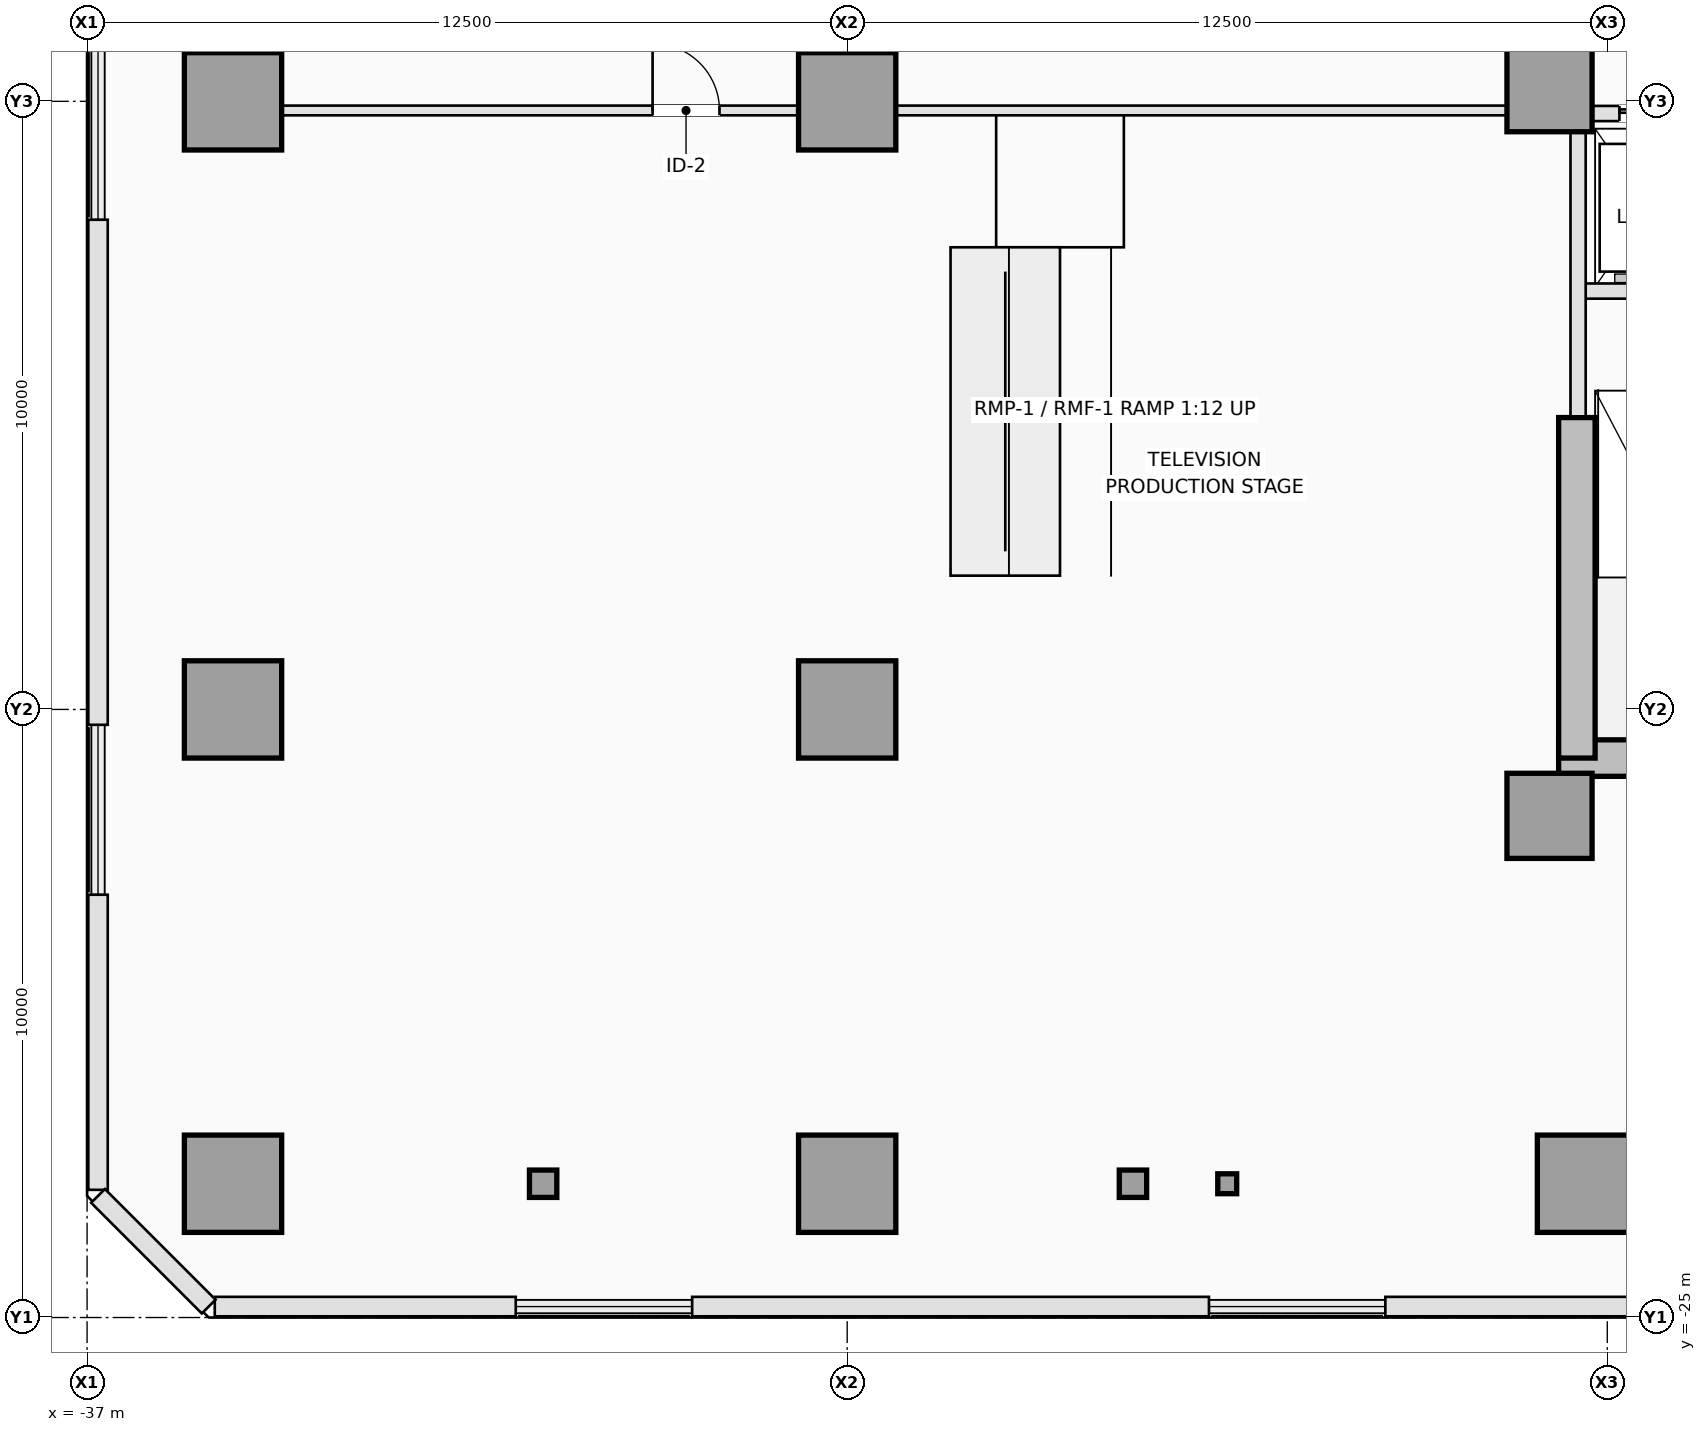
"""IFC4 building model, lengths in metres.
Left out: names, types, materials, properties, quantities, classifications, styles, units other than length and angle.
Written with IfcOpenShell. Run it as: python <this file> out.ifc"""

import sys

from ifc_helpers import new_model, si_unit, direction, frame, frame_2d, origin, origin_2d, place, context, subcontext, project, spatial, rectangle, i_section, extrude, element, fill, save


model = new_model("IFC4")
c1 = context("Model", 3, precision=1e-05, world=origin(), true_north=direction((0.0, 1.0)))
c2 = subcontext(c1, "Body", "Model", "MODEL_VIEW")
j1 = project(units=[si_unit("LENGTHUNIT", "METRE"), si_unit("PLANEANGLEUNIT", "RADIAN")], contexts=[c1])
p1 = place(None, origin())
s1 = spatial("IfcSite", under=j1, at=p1, CompositionType="ELEMENT")
p2 = place(p1, origin())
s2 = spatial("IfcBuilding", under=s1, at=p2, CompositionType="ELEMENT")
p3 = place(p2, frame((0.0, 0.0, 5.0)))
s3 = spatial("IfcBuildingStorey", under=s2, at=p3, CompositionType="ELEMENT", Elevation=5.0)
p4 = place(p3, frame((-12.8, -15.8, 0.0), z_axis=(0.0, 0.0, 1.0), x_axis=(1.0, 0.0, 0.0)))
e1 = element("IfcWall", 1, at=p4, inside=s3, PredefinedType="SHEAR", context=c2, shape_type="SweptSolid", body=[
    extrude(rectangle(XDim=4.2, YDim=0.6, at=frame_2d((2.1, 0.0))), origin(), (0.0, 0.0, 1.0), 4.5),
])
p5 = place(p3, frame((-12.5, -15.8, 0.0), z_axis=(0.0, 0.0, 1.0), x_axis=(0.0, 1.0, 0.0)))
e2 = element("IfcWall", 2, at=p5, inside=s3, PredefinedType="SHEAR", context=c2, shape_type="SweptSolid", body=[
    extrude(rectangle(XDim=5.6, YDim=0.6, at=frame_2d((2.8, 0.0))), origin(), (0.0, 0.0, 1.0), 4.5),
])
for number, where, z_axis, x_axis in (
    (3, (-12.95, -16.75, 0.0), (0.0, 0.0, 1.0), (1.0, 0.0, 0.0)),
    (4, (-12.95, -4.8, 0.0), (0.0, 0.0, 1.0), (1.0, 0.0, 0.0)),
):
    element("IfcColumn", number, at=place(p3, frame(where, z_axis=z_axis, x_axis=x_axis)), inside=s3, PredefinedType="COLUMN", context=c2, shape_type="SweptSolid", body=[
        extrude(rectangle(XDim=1.4, YDim=1.4, at=origin_2d()), origin(), (0.0, 0.0, 1.0), 4.5),
    ])
for number, where, z_axis, x_axis in (
    (5, (-34.6, -22.8, 0.0), (0.0, 0.0, 1.0), (1.0, 0.0, 0.0)),
    (6, (-24.5, -22.8, 0.0), (0.0, 0.0, 1.0), (1.0, 0.0, 0.0)),
    (7, (-12.35, -22.8, 0.0), (0.0, 0.0, 1.0), (1.0, 0.0, 0.0)),
    (8, (-34.6, -15.0, 0.0), (0.0, 0.0, 1.0), (1.0, 0.0, 0.0)),
    (9, (-24.5, -15.0, 0.0), (0.0, 0.0, 1.0), (1.0, 0.0, 0.0)),
    (10, (-34.6, -5.0, 0.0), (0.0, 0.0, 1.0), (1.0, 0.0, 0.0)),
    (11, (-24.5, -5.0, 0.0), (0.0, 0.0, 1.0), (1.0, 0.0, 0.0)),
):
    element("IfcColumn", number, at=place(p3, frame(where, z_axis=z_axis, x_axis=x_axis)), inside=s3, PredefinedType="COLUMN", context=c2, shape_type="SweptSolid", body=[
        extrude(rectangle(XDim=1.6, YDim=1.6, at=origin_2d()), origin(), (0.0, 0.0, 1.0), 4.5),
    ])
p6 = place(p3, frame((-18.25, -22.8, 0.0), z_axis=(0.0, 0.0, 1.0), x_axis=(1.0, 0.0, 0.0)))
e12 = element("IfcColumn", 12, at=p6, inside=s3, PredefinedType="COLUMN", context=c2, shape_type="SweptSolid", body=[
    extrude(i_section(OverallWidth=0.311, OverallDepth=0.327, WebThickness=0.016, FlangeThickness=0.025, FilletRadius=0.017, at=origin_2d()), origin(), (0.0, 0.0, 1.0), 4.5),
])
for number, where, z_axis, x_axis in (
    (13, (-29.5, -22.8, 0.0), (0.0, 0.0, 1.0), (1.0, 0.0, 0.0)),
    (14, (-19.8, -22.8, 0.0), (0.0, 0.0, 1.0), (1.0, 0.0, 0.0)),
):
    element("IfcColumn", number, at=place(p3, frame(where, z_axis=z_axis, x_axis=x_axis)), inside=s3, PredefinedType="PILASTER", context=c2, shape_type="SweptSolid", body=[
        extrude(rectangle(XDim=0.45, YDim=0.45, at=origin_2d()), origin(), (0.0, 0.0, 1.0), 4.5),
    ])
p7 = place(p3, frame((-10.95, -24.82, 0.0), z_axis=(0.0, 0.0, 1.0), x_axis=(-1.0, 0.0, 0.0)))
e15 = element("IfcWall", 15, at=p7, inside=s3, PredefinedType="STANDARD", context=c2, shape_type="SweptSolid", body=[
    extrude(rectangle(XDim=4.699, YDim=0.32, at=frame_2d((2.35, 0.0))), origin(), (0.0, 0.0, 1.0), 4.2),
])
p8 = place(p3, frame((-18.551, -24.82, 0.0), z_axis=(0.0, 0.0, 1.0), x_axis=(-1.0, 0.0, 0.0)))
e16 = element("IfcWall", 16, at=p8, inside=s3, PredefinedType="STANDARD", context=c2, shape_type="SweptSolid", body=[
    extrude(rectangle(XDim=8.499, YDim=0.32, at=frame_2d((4.25, 0.0))), origin(), (0.0, 0.0, 1.0), 4.2),
])
p9 = place(p3, frame((-29.95, -24.82, 0.0), z_axis=(0.0, 0.0, 1.0), x_axis=(-1.0, 0.0, 0.0)))
e17 = element("IfcWall", 17, at=p9, inside=s3, PredefinedType="STANDARD", context=c2, shape_type="SweptSolid", body=[
    extrude(rectangle(XDim=4.949, YDim=0.32, at=frame_2d((2.475, 0.0))), origin(), (0.0, 0.0, 1.0), 4.2),
])
p10 = place(p3, frame((-36.82, -22.9, 0.0), z_axis=(0.0, 0.0, 1.0), x_axis=(0.0, 1.0, 0.0)))
e18 = element("IfcWall", 18, at=p10, inside=s3, PredefinedType="STANDARD", context=c2, shape_type="SweptSolid", body=[
    extrude(rectangle(XDim=4.853, YDim=0.32, at=frame_2d((2.426, 0.0))), origin(), (0.0, 0.0, 1.0), 4.2),
])
p11 = place(p3, frame((-36.82, -15.253, 0.0), z_axis=(0.0, 0.0, 1.0), x_axis=(0.0, 1.0, 0.0)))
e19 = element("IfcWall", 19, at=p11, inside=s3, PredefinedType="STANDARD", context=c2, shape_type="SweptSolid", body=[
    extrude(rectangle(XDim=8.305, YDim=0.32, at=frame_2d((4.153, 0.0))), origin(), (0.0, 0.0, 1.0), 4.2),
])
p12 = place(p3, frame((-35.0, -24.82, 0.0), z_axis=(0.0, 0.0, 1.0), x_axis=(-0.707106781187, 0.707106781187, 0.0)))
e20 = element("IfcWall", 20, at=p12, inside=s3, PredefinedType="STANDARD", context=c2, shape_type="SweptSolid", body=[
    extrude(rectangle(XDim=2.574, YDim=0.32, at=frame_2d((1.287, 0.0))), origin(), (0.0, 0.0, 1.0), 4.2),
])
p13 = place(p3, frame((-12.38, -8.12, 0.0), z_axis=(0.0, 0.0, 1.0), x_axis=(1.0, 0.0, 0.0)))
e21 = element("IfcWall", 21, at=p13, inside=s3, PredefinedType="PARTITIONING", context=c2, shape_type="SweptSolid", body=[
    extrude(rectangle(XDim=3.22, YDim=0.25, at=frame_2d((1.61, 0.0))), origin(), (0.0, 0.0, 1.0), 4.2),
])
p14 = place(p3, frame((-12.48, -10.18, 0.0), z_axis=(0.0, 0.0, 1.0), x_axis=(0.0, 1.0, 0.0)))
e22 = element("IfcWall", 22, at=p14, inside=s3, PredefinedType="PARTITIONING", context=c2, shape_type="SweptSolid", body=[
    extrude(rectangle(XDim=4.678, YDim=0.25, at=frame_2d((2.339, 0.0))), origin(), (0.0, 0.0, 1.0), 4.2),
])
p15 = place(p3, frame((-12.248, -5.2, 0.0), z_axis=(0.0, 0.0, 1.0), x_axis=(1.0, 0.0, 0.0)))
e23 = element("IfcWall", 23, at=p15, inside=s3, PredefinedType="PARTITIONING", context=c2, shape_type="SweptSolid", body=[
    extrude(rectangle(XDim=7.796, YDim=0.25, at=frame_2d((3.898, 0.0))), origin(), (0.0, 0.0, 1.0), 4.2),
])
p16 = place(p15, frame((0.448, 0.0, 0.0)))
e24 = element("IfcOpeningElement", 24, at=p16, cuts=e23, PredefinedType="OPENING", context=c2, shape_type="SweptSolid", body=[
    extrude(rectangle(XDim=1.0, YDim=2.15, at=frame_2d((0.5, 1.075))), frame((0.0, 0.135, 0.0), z_axis=(0.0, -1.0, 0.0), x_axis=(1.0, 0.0, 0.0)), (0.0, 0.0, 1.0), 0.27),
])
p17 = place(p15, frame((2.398, 0.0, 0.0)))
e25 = element("IfcOpeningElement", 25, at=p17, cuts=e23, PredefinedType="OPENING", context=c2, shape_type="SweptSolid", body=[
    extrude(rectangle(XDim=1.0, YDim=2.15, at=frame_2d((0.5, 1.075))), frame((0.0, 0.135, 0.0), z_axis=(0.0, -1.0, 0.0), x_axis=(1.0, 0.0, 0.0)), (0.0, 0.0, 1.0), 0.27),
])
p18 = place(p15, frame((4.348, 0.0, 0.0)))
e26 = element("IfcOpeningElement", 26, at=p18, cuts=e23, PredefinedType="OPENING", context=c2, shape_type="SweptSolid", body=[
    extrude(rectangle(XDim=1.0, YDim=2.15, at=frame_2d((0.5, 1.075))), frame((0.0, 0.135, 0.0), z_axis=(0.0, -1.0, 0.0), x_axis=(1.0, 0.0, 0.0)), (0.0, 0.0, 1.0), 0.27),
])
p19 = place(p15, frame((6.298, 0.0, 0.0)))
e27 = element("IfcOpeningElement", 27, at=p19, cuts=e23, PredefinedType="OPENING", context=c2, shape_type="SweptSolid", body=[
    extrude(rectangle(XDim=1.0, YDim=2.15, at=frame_2d((0.5, 1.075))), frame((0.0, 0.135, 0.0), z_axis=(0.0, -1.0, 0.0), x_axis=(1.0, 0.0, 0.0)), (0.0, 0.0, 1.0), 0.27),
])
p20 = place(p3, frame((-33.798, -5.15, 0.0), z_axis=(0.0, 0.0, 1.0), x_axis=(1.0, 0.0, 0.0)))
e28 = element("IfcWall", 28, at=p20, inside=s3, PredefinedType="PARTITIONING", context=c2, shape_type="SweptSolid", body=[
    extrude(rectangle(XDim=8.496, YDim=0.16, at=frame_2d((4.248, 0.0))), origin(), (0.0, 0.0, 1.0), 3.176),
])
p21 = place(p20, frame((6.098, 0.0, 0.0)))
e29 = element("IfcOpeningElement", 29, at=p21, cuts=e28, PredefinedType="OPENING", context=c2, shape_type="SweptSolid", body=[
    extrude(rectangle(XDim=1.1, YDim=2.15, at=frame_2d((0.55, 1.075))), frame((0.0, 0.09, 0.0), z_axis=(0.0, -1.0, 0.0), x_axis=(1.0, 0.0, 0.0)), (0.0, 0.0, 1.0), 0.18),
])
p22 = place(p3, frame((-23.698, -5.15, 0.0), z_axis=(0.0, 0.0, 1.0), x_axis=(1.0, 0.0, 0.0)))
e30 = element("IfcWall", 30, at=p22, inside=s3, PredefinedType="PARTITIONING", context=c2, shape_type="SweptSolid", body=[
    extrude(rectangle(XDim=10.046, YDim=0.16, at=frame_2d((5.023, 0.0))), origin(), (0.0, 0.0, 1.0), 3.176),
])
p23 = place(p16, origin())
e31 = element("IfcDoor", 31, at=p23, inside=s3, OperationType="SLIDING_TO_LEFT", PredefinedType="DOOR", context=c2, shape_type="SweptSolid", body=[
    extrude(rectangle(XDim=1.0, YDim=2.15, at=frame_2d((0.5, 1.075))), frame((0.0, 0.025, 0.0), z_axis=(0.0, -1.0, 0.0), x_axis=(1.0, 0.0, 0.0)), (0.0, 0.0, 1.0), 0.05),
])
fill(e24, e31)
p24 = place(p21, origin())
e32 = element("IfcDoor", 32, at=p24, inside=s3, OperationType="SINGLE_SWING_LEFT", PredefinedType="DOOR", context=c2, shape_type="SweptSolid", body=[
    extrude(rectangle(XDim=1.1, YDim=2.15, at=frame_2d((0.55, 1.075))), frame((0.0, 0.025, 0.0), z_axis=(0.0, -1.0, 0.0), x_axis=(1.0, 0.0, 0.0)), (0.0, 0.0, 1.0), 0.05),
])
fill(e29, e32)
save(model, sys.argv[1])
